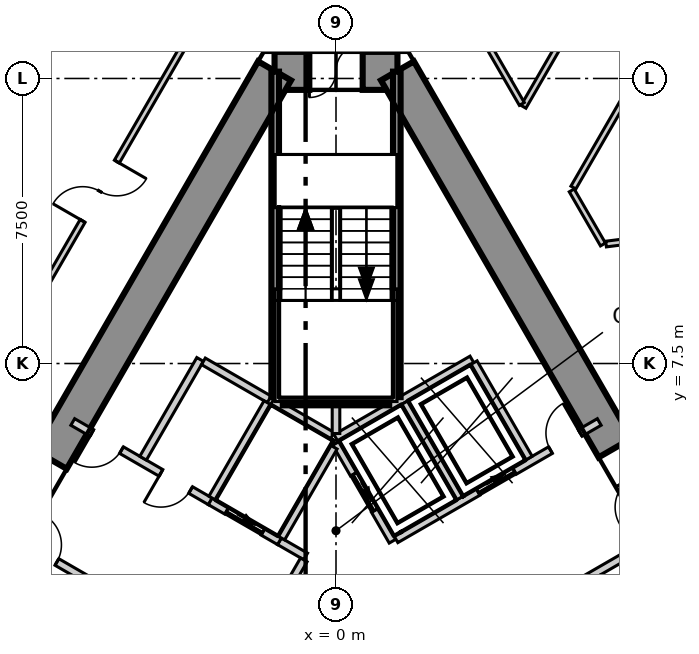
"""IFC4 building model, lengths in metres.
Left out: names, types, materials, properties, quantities, classifications, styles, units other than length and angle.
Written with IfcOpenShell. Run it as: python <this file> out.ifc"""

import sys

from ifc_helpers import new_model, si_unit, direction, frame, frame_2d, origin, place, context, subcontext, project, spatial, polyline, rectangle, outline, extrude, element, fill, save


model = new_model("IFC4")
c1 = context("Model", 3, precision=1e-05, world=origin(), true_north=direction((0.0, 1.0)))
c2 = subcontext(c1, "Body", "Model", "MODEL_VIEW")
j1 = project(units=[si_unit("LENGTHUNIT", "METRE"), si_unit("PLANEANGLEUNIT", "RADIAN")], contexts=[c1])
p1 = place(None, origin())
s1 = spatial("IfcSite", under=j1, at=p1, CompositionType="ELEMENT")
p2 = place(p1, origin())
s2 = spatial("IfcBuilding", under=s1, at=p2, CompositionType="ELEMENT")
p3 = place(p2, frame((0.0, 0.0, 19.9)))
s3 = spatial("IfcBuildingStorey", under=s2, at=p3, CompositionType="ELEMENT", Elevation=19.9)
p4 = place(p3, frame((1.617, 15.2, -0.4), z_axis=(0.0, 0.0, 1.0), x_axis=(-1.0, 0.0, 0.0)))
e1 = element("IfcWall", 1, at=p4, inside=s3, PredefinedType="SHEAR", context=c2, shape_type="SweptSolid", body=[
    extrude(outline(polyline([(-0.288, -0.5), (1.617, -0.5), (3.522, -0.5), (2.945, 0.5), (1.617, 0.5), (0.289, 0.5), (-0.288, -0.5)])), origin(), (0.0, 0.0, 1.0), 5.4),
])
p5 = place(p4, frame((0.917, 0.0, 0.4)))
e2 = element("IfcOpeningElement", 2, at=p5, cuts=e1, PredefinedType="OPENING", context=c2, shape_type="SweptSolid", body=[
    extrude(rectangle(XDim=1.4, YDim=2.1, at=frame_2d((0.7, 1.05))), frame((0.0, 0.51, 0.0), z_axis=(0.0, -1.0, 0.0), x_axis=(1.0, 0.0, 0.0)), (0.0, 0.0, 1.0), 1.02),
])
p6 = place(p3, frame((-1.617, 15.2, -0.4), z_axis=(0.0, 0.0, 1.0), x_axis=(-0.499992141631, -0.866029940768, 0.0)))
e3 = element("IfcWall", 3, at=p6, inside=s3, PredefinedType="SHEAR", context=c2, shape_type="SweptSolid", body=[
    extrude(outline(polyline([(-0.289, -0.499), (1.656, -0.499), (3.601, -0.499), (5.547, -0.499), (7.492, -0.499), (9.437, -0.5), (11.382, -0.5), (13.328, -0.5), (15.273, -0.5), (17.218, -0.5), (19.163, -0.5), (21.109, -0.5), (23.054, -0.5), (24.999, -0.5), (24.422, 0.5), (22.566, 0.5), (20.709, 0.5), (18.853, 0.5), (16.997, 0.5), (15.14, 0.5), (13.284, 0.5), (11.427, 0.5), (9.571, 0.5), (7.715, 0.5), (5.858, 0.5), (4.002, 0.5), (2.146, 0.5), (0.289, 0.5), (-0.289, -0.499)])), origin(), (0.0, 0.0, 1.0), 5.4),
])
p7 = place(p6, frame((11.805, 0.0, 0.4)))
e4 = element("IfcOpeningElement", 4, at=p7, cuts=e3, PredefinedType="OPENING", context=c2, shape_type="SweptSolid", body=[
    extrude(rectangle(XDim=1.1, YDim=2.1, at=frame_2d((0.55, 1.05))), frame((0.0, 0.51, 0.0), z_axis=(0.0, -1.0, 0.0), x_axis=(1.0, 0.0, 0.0)), (0.0, 0.0, 1.0), 1.02),
])
p8 = place(p3, frame((13.972, -6.2, -0.4), z_axis=(0.0, 0.0, 1.0), x_axis=(-0.499992141631, 0.866029940768, 0.0)))
e5 = element("IfcWall", 5, at=p8, inside=s3, PredefinedType="SHEAR", context=c2, shape_type="SweptSolid", body=[
    extrude(outline(polyline([(-0.288, -0.5), (1.657, -0.5), (3.602, -0.5), (5.547, -0.5), (7.493, -0.5), (9.438, -0.5), (11.383, -0.5), (13.328, -0.5), (15.273, -0.5), (17.218, -0.499), (19.164, -0.499), (21.109, -0.499), (23.054, -0.499), (24.999, -0.499), (24.422, 0.5), (22.566, 0.5), (20.709, 0.5), (18.853, 0.5), (16.996, 0.5), (15.14, 0.5), (13.283, 0.5), (11.427, 0.5), (9.57, 0.5), (7.714, 0.5), (5.857, 0.5), (4.001, 0.5), (2.145, 0.5), (0.288, 0.5), (-0.288, -0.5)])), origin(), (0.0, 0.0, 1.0), 5.4),
])
p9 = place(p8, frame((11.455, 0.0, 0.4)))
e6 = element("IfcOpeningElement", 6, at=p9, cuts=e5, PredefinedType="OPENING", context=c2, shape_type="SweptSolid", body=[
    extrude(rectangle(XDim=1.8, YDim=2.1, at=frame_2d((0.9, 1.05))), frame((0.0, 0.51, 0.0), z_axis=(0.0, -1.0, 0.0), x_axis=(1.0, 0.0, 0.0)), (0.0, 0.0, 1.0), 1.02),
])
p10 = place(p3, frame((-8.977, 7.252, 0.0), z_axis=(0.0, 0.0, 1.0), x_axis=(0.500037258536, 0.86600389149, 0.0)))
e7 = element("IfcWall", 7, at=p10, inside=s3, PredefinedType="PARTITIONING", context=c2, shape_type="SweptSolid", body=[
    extrude(rectangle(XDim=11.949, YDim=0.15, at=frame_2d((5.975, 0.0))), origin(), (0.0, 0.0, 1.0), 5.0),
])
p11 = place(p10, frame((4.62, 0.0, 0.0)))
e8 = element("IfcOpeningElement", 8, at=p11, cuts=e7, PredefinedType="OPENING", context=c2, shape_type="SweptSolid", body=[
    extrude(rectangle(XDim=1.8, YDim=2.1, at=frame_2d((0.9, 1.05))), frame((0.0, 0.085, 0.0), z_axis=(0.0, -1.0, 0.0), x_axis=(1.0, 0.0, 0.0)), (0.0, 0.0, 1.0), 0.17),
])
p12 = place(p3, frame((4.933, 14.255, 0.0), z_axis=(0.0, 0.0, 1.0), x_axis=(0.500039629421, 0.866002522519, 0.0)))
e9 = element("IfcWall", 9, at=p12, inside=s3, PredefinedType="PARTITIONING", context=c2, shape_type="SweptSolid", body=[
    extrude(rectangle(XDim=6.085, YDim=0.15, at=frame_2d((3.043, 0.0))), origin(), (0.0, 0.0, 1.0), 5.0),
])
p13 = place(p3, frame((3.002, 17.6, 0.0), z_axis=(0.0, 0.0, 1.0), x_axis=(0.499998569178, -0.866026229868, 0.0)))
e10 = element("IfcWall", 10, at=p13, inside=s3, PredefinedType="PARTITIONING", context=c2, shape_type="SweptSolid", body=[
    extrude(rectangle(XDim=3.776, YDim=0.15, at=frame_2d((1.888, 0.0))), origin(), (0.0, 0.0, 1.0), 5.0),
])
p14 = place(p3, frame((6.203, 12.055, 0.0), z_axis=(0.0, 0.0, 1.0), x_axis=(0.500245418622, -0.865883664904, 0.0)))
e11 = element("IfcWall", 11, at=p14, inside=s3, PredefinedType="PARTITIONING", context=c2, shape_type="SweptSolid", body=[
    extrude(rectangle(XDim=1.643, YDim=0.15, at=frame_2d((0.822, 0.0))), origin(), (0.0, 0.0, 1.0), 5.0),
])
p15 = place(p3, frame((7.106, 10.643, 0.0), z_axis=(0.0, 0.0, 1.0), x_axis=(0.992038919821, 0.125931654321, 0.0)))
e12 = element("IfcWall", 12, at=p15, inside=s3, PredefinedType="PARTITIONING", context=c2, shape_type="SweptSolid", body=[
    extrude(rectangle(XDim=11.847, YDim=0.15, at=frame_2d((5.924, 0.0))), origin(), (0.0, 0.0, 1.0), 5.0),
])
p16 = place(p3, frame((6.247, 12.13, 0.0), z_axis=(0.0, 0.0, 1.0), x_axis=(0.49995867205, 0.866049263173, 0.0)))
e13 = element("IfcWall", 13, at=p16, inside=s3, PredefinedType="PARTITIONING", context=c2, shape_type="SweptSolid", body=[
    extrude(rectangle(XDim=12.615, YDim=0.15, at=frame_2d((6.307, 0.0))), origin(), (0.0, 0.0, 1.0), 5.0),
])
p17 = place(p16, frame((5.364, 0.0, 0.0)))
e14 = element("IfcOpeningElement", 14, at=p17, cuts=e13, PredefinedType="OPENING", context=c2, shape_type="SweptSolid", body=[
    extrude(rectangle(XDim=1.8, YDim=2.1, at=frame_2d((0.9, 1.05))), frame((0.0, 0.085, 0.0), z_axis=(0.0, -1.0, 0.0), x_axis=(1.0, 0.0, 0.0)), (0.0, 0.0, 1.0), 0.17),
])
p18 = place(p3, frame((-0.002, 5.542, 0.0), z_axis=(0.0, 0.0, 1.0), x_axis=(0.866103910842, 0.499863997127, 0.0)))
e15 = element("IfcWall", 15, at=p18, inside=s3, PredefinedType="SOLIDWALL", context=c2, shape_type="SweptSolid", body=[
    extrude(rectangle(XDim=4.131, YDim=0.2, at=frame_2d((2.065, 0.0))), origin(), (0.0, 0.0, 1.0), 5.0),
])
p19 = place(p3, frame((0.0, 5.4, 0.0), z_axis=(0.0, 0.0, 1.0), x_axis=(0.500103862429, -0.865965430478, 0.0)))
e16 = element("IfcWall", 16, at=p19, inside=s3, PredefinedType="SOLIDWALL", context=c2, shape_type="SweptSolid", body=[
    extrude(rectangle(XDim=2.973, YDim=0.2, at=frame_2d((1.487, 0.0))), origin(), (0.0, 0.0, 1.0), 5.0),
])
p20 = place(p19, frame((0.937, 0.0, 0.0)))
e17 = element("IfcOpeningElement", 17, at=p20, cuts=e16, PredefinedType="OPENING", context=c2, shape_type="SweptSolid", body=[
    extrude(rectangle(XDim=1.1, YDim=2.1, at=frame_2d((0.55, 1.05))), frame((0.0, 0.11, 0.0), z_axis=(0.0, -1.0, 0.0), x_axis=(1.0, 0.0, 0.0)), (0.0, 0.0, 1.0), 0.22),
])
p21 = place(p3, frame((1.578, 2.874, 0.0), z_axis=(0.0, 0.0, 1.0), x_axis=(0.866055259465, 0.499948284879, 0.0)))
e18 = element("IfcWall", 18, at=p21, inside=s3, PredefinedType="SOLIDWALL", context=c2, shape_type="SweptSolid", body=[
    extrude(rectangle(XDim=6.177, YDim=0.2, at=frame_2d((3.088, 0.0))), origin(), (0.0, 0.0, 1.0), 5.0),
])
p22 = place(p21, frame((2.496, 0.0, 0.0)))
e19 = element("IfcOpeningElement", 19, at=p22, cuts=e18, PredefinedType="OPENING", context=c2, shape_type="SweptSolid", body=[
    extrude(rectangle(XDim=1.1, YDim=2.1, at=frame_2d((0.55, 1.05))), frame((0.0, 0.11, 0.0), z_axis=(0.0, -1.0, 0.0), x_axis=(1.0, 0.0, 0.0)), (0.0, 0.0, 1.0), 0.22),
])
p23 = place(p21, frame((4.696, 0.0, 0.0)))
e20 = element("IfcOpeningElement", 20, at=p23, cuts=e18, PredefinedType="OPENING", context=c2, shape_type="SweptSolid", body=[
    extrude(rectangle(XDim=0.9, YDim=2.1, at=frame_2d((0.45, 1.05))), frame((0.0, 0.11, 0.0), z_axis=(0.0, -1.0, 0.0), x_axis=(1.0, 0.0, 0.0)), (0.0, 0.0, 1.0), 0.22),
])
p24 = place(p3, frame((3.278, -0.071, 0.0), z_axis=(0.0, 0.0, 1.0), x_axis=(0.865959795517, 0.500113619639, 0.0)))
e21 = element("IfcWall", 21, at=p24, inside=s3, PredefinedType="SOLIDWALL", context=c2, shape_type="SweptSolid", body=[
    extrude(rectangle(XDim=6.177, YDim=0.2, at=frame_2d((3.088, 0.0))), origin(), (0.0, 0.0, 1.0), 5.0),
])
for number, where, z_axis, x_axis in (
    (22, (3.626, 7.52, 0.0), (0.0, 0.0, 1.0), (0.5, -0.866, 0.0)),
    (23, (1.807, 6.47, 0.0), (0.0, 0.0, 1.0), (0.5, -0.866, 0.0)),
):
    element("IfcWall", number, at=place(p3, frame(where, z_axis=z_axis, x_axis=x_axis)), inside=s3, PredefinedType="SOLIDWALL", context=c2, shape_type="SweptSolid", body=[
        extrude(rectangle(XDim=2.9, YDim=0.2, at=frame_2d((1.45, 0.0))), origin(), (0.0, 0.0, 1.0), 5.0),
    ])
p25 = place(p3, frame((-8.627, 3.018, 0.0), z_axis=(0.0, 0.0, 1.0), x_axis=(0.866039775641, -0.499975106388, 0.0)))
e24 = element("IfcWall", 24, at=p25, inside=s3, PredefinedType="SOLIDWALL", context=c2, shape_type="SweptSolid", body=[
    extrude(rectangle(XDim=4.182, YDim=0.2, at=frame_2d((2.091, 0.0))), origin(), (0.0, 0.0, 1.0), 5.0),
])
p26 = place(p25, frame((2.58, 0.0, 0.0)))
e25 = element("IfcOpeningElement", 25, at=p26, cuts=e24, PredefinedType="OPENING", context=c2, shape_type="SweptSolid", body=[
    extrude(rectangle(XDim=1.1, YDim=2.1, at=frame_2d((0.55, 1.05))), frame((0.0, 0.11, 0.0), z_axis=(0.0, -1.0, 0.0), x_axis=(1.0, 0.0, 0.0)), (0.0, 0.0, 1.0), 0.22),
])
p27 = place(p25, frame((0.58, 0.0, 0.0)))
e26 = element("IfcOpeningElement", 26, at=p27, cuts=e24, PredefinedType="OPENING", context=c2, shape_type="SweptSolid", body=[
    extrude(rectangle(XDim=0.9, YDim=2.1, at=frame_2d((0.45, 1.05))), frame((0.0, 0.11, 0.0), z_axis=(0.0, -1.0, 0.0), x_axis=(1.0, 0.0, 0.0)), (0.0, 0.0, 1.0), 0.22),
])
p28 = place(p3, frame((-6.927, 5.962, 0.0), z_axis=(0.0, 0.0, 1.0), x_axis=(0.866065051207, -0.49993132236, 0.0)))
e27 = element("IfcWall", 27, at=p28, inside=s3, PredefinedType="SOLIDWALL", context=c2, shape_type="SweptSolid", body=[
    extrude(rectangle(XDim=4.182, YDim=0.2, at=frame_2d((2.091, 0.0))), origin(), (0.0, 0.0, 1.0), 5.0),
])
p29 = place(p28, frame((2.68, 0.0, 0.0)))
e28 = element("IfcOpeningElement", 28, at=p29, cuts=e27, PredefinedType="OPENING", context=c2, shape_type="SweptSolid", body=[
    extrude(rectangle(XDim=0.9, YDim=2.1, at=frame_2d((0.45, 1.05))), frame((0.0, 0.11, 0.0), z_axis=(0.0, -1.0, 0.0), x_axis=(1.0, 0.0, 0.0)), (0.0, 0.0, 1.0), 0.22),
])
p30 = place(p28, frame((0.58, 0.0, 0.0)))
e29 = element("IfcOpeningElement", 29, at=p30, cuts=e27, PredefinedType="OPENING", context=c2, shape_type="SweptSolid", body=[
    extrude(rectangle(XDim=0.9, YDim=2.1, at=frame_2d((0.45, 1.05))), frame((0.0, 0.11, 0.0), z_axis=(0.0, -1.0, 0.0), x_axis=(1.0, 0.0, 0.0)), (0.0, 0.0, 1.0), 0.22),
])
p31 = place(p3, frame((-1.488, 2.822, 0.0), z_axis=(0.0, 0.0, 1.0), x_axis=(0.866236612152, -0.499633997809, 0.0)))
e30 = element("IfcWall", 30, at=p31, inside=s3, PredefinedType="SOLIDWALL", context=c2, shape_type="SweptSolid", body=[
    extrude(rectangle(XDim=0.796, YDim=0.2, at=frame_2d((0.398, 0.0))), origin(), (0.0, 0.0, 1.0), 5.0),
])
p32 = place(p3, frame((-5.076, 5.009, 0.0), z_axis=(0.0, 0.0, 1.0), x_axis=(0.50002537861, 0.866010750942, 0.0)))
e31 = element("IfcWall", 31, at=p32, inside=s3, PredefinedType="SOLIDWALL", context=c2, shape_type="SweptSolid", body=[
    extrude(rectangle(XDim=3.0, YDim=0.2, at=frame_2d((1.5, 0.0))), origin(), (0.0, 0.0, 1.0), 5.0),
])
p33 = place(p3, frame((-3.489, 7.557, 0.0), z_axis=(0.0, 0.0, 1.0), x_axis=(0.866010750942, -0.50002537861, 0.0)))
e32 = element("IfcWall", 32, at=p33, inside=s3, PredefinedType="SOLIDWALL", context=c2, shape_type="SweptSolid", body=[
    extrude(rectangle(XDim=2.0, YDim=0.2, at=frame_2d((1.0, 0.0))), origin(), (0.0, 0.0, 1.0), 5.0),
])
p34 = place(p3, frame((-2.444, -0.433, 0.0), z_axis=(0.0, 0.0, 1.0), x_axis=(0.500035624827, 0.866004834804, 0.0)))
e33 = element("IfcWall", 33, at=p34, inside=s3, PredefinedType="SOLIDWALL", context=c2, shape_type="SweptSolid", body=[
    extrude(rectangle(XDim=3.194, YDim=0.2, at=frame_2d((1.597, 0.0))), origin(), (0.0, 0.0, 1.0), 5.0),
])
p35 = place(p3, frame((-3.309, 3.873, 0.0), z_axis=(0.0, 0.0, 1.0), x_axis=(0.866098583652, -0.499873227325, 0.0)))
e34 = element("IfcWall", 34, at=p35, inside=s3, PredefinedType="SOLIDWALL", context=c2, shape_type="SweptSolid", body=[
    extrude(rectangle(XDim=2.103, YDim=0.2, at=frame_2d((1.051, 0.0))), origin(), (0.0, 0.0, 1.0), 5.0),
])
p36 = place(p35, frame((0.502, 0.0, 0.0)))
e35 = element("IfcOpeningElement", 35, at=p36, cuts=e34, PredefinedType="OPENING", context=c2, shape_type="SweptSolid", body=[
    extrude(rectangle(XDim=1.1, YDim=2.1, at=frame_2d((0.55, 1.05))), frame((0.0, 0.11, 0.0), z_axis=(0.0, -1.0, 0.0), x_axis=(1.0, 0.0, 0.0)), (0.0, 0.0, 1.0), 0.22),
])
p37 = place(p3, frame((-3.257, 3.959, 0.0), z_axis=(0.0, 0.0, 1.0), x_axis=(0.50012328804, 0.865954211699, 0.0)))
e36 = element("IfcWall", 36, at=p37, inside=s3, PredefinedType="SOLIDWALL", context=c2, shape_type="SweptSolid", body=[
    extrude(rectangle(XDim=2.9, YDim=0.2, at=frame_2d((1.45, 0.0))), origin(), (0.0, 0.0, 1.0), 5.0),
])
p38 = place(p3, frame((-1.67, 6.507, 0.0), z_axis=(0.0, 0.0, 1.0), x_axis=(0.865941441609, -0.500145398563, 0.0)))
e37 = element("IfcWall", 37, at=p38, inside=s3, PredefinedType="SOLIDWALL", context=c2, shape_type="SweptSolid", body=[
    extrude(rectangle(XDim=1.815, YDim=0.2, at=frame_2d((0.908, 0.0))), origin(), (0.0, 0.0, 1.0), 5.0),
])
p39 = place(p3, frame((-1.438, 2.909, 0.0), z_axis=(0.0, 0.0, 1.0), x_axis=(0.499829630636, 0.866123744241, 0.0)))
e38 = element("IfcWall", 38, at=p39, inside=s3, PredefinedType="SOLIDWALL", context=c2, shape_type="SweptSolid", body=[
    extrude(rectangle(XDim=2.761, YDim=0.2, at=frame_2d((1.38, 0.0))), origin(), (0.0, 0.0, 1.0), 5.0),
])
p40 = place(p3, frame((0.0, 5.658, 0.0), z_axis=(0.0, 0.0, 1.0), x_axis=(0.0, 1.0, 0.0)))
e39 = element("IfcWall", 39, at=p40, inside=s3, PredefinedType="SOLIDWALL", context=c2, shape_type="SweptSolid", body=[
    extrude(rectangle(XDim=0.742, YDim=0.2, at=frame_2d((0.371, 0.0))), origin(), (0.0, 0.0, 1.0), 5.0),
])
p41 = place(p3, frame((1.6, 6.615, 0.0), z_axis=(0.0, 0.0, 1.0), x_axis=(0.0, 1.0, 0.0)))
e40 = element("IfcWall", 40, at=p41, inside=s3, PredefinedType="SOLIDWALL", context=c2, shape_type="SweptSolid", body=[
    extrude(rectangle(XDim=8.565, YDim=0.2, at=frame_2d((4.282, 0.0))), origin(), (0.0, 0.0, 1.0), 5.0),
])
p42 = place(p3, frame((-1.4, 6.5, 0.0), z_axis=(0.0, 0.0, 1.0), x_axis=(1.0, 0.0, 0.0)))
e41 = element("IfcWall", 41, at=p42, inside=s3, PredefinedType="SOLIDWALL", context=c2, shape_type="SweptSolid", body=[
    extrude(rectangle(XDim=2.8, YDim=0.2, at=frame_2d((1.4, 0.0))), origin(), (0.0, 0.0, 1.0), 5.0),
])
p43 = place(p3, frame((-1.6, 6.615, 0.0), z_axis=(0.0, 0.0, 1.0), x_axis=(0.0, 1.0, 0.0)))
e42 = element("IfcWall", 42, at=p43, inside=s3, PredefinedType="SOLIDWALL", context=c2, shape_type="SweptSolid", body=[
    extrude(rectangle(XDim=8.565, YDim=0.2, at=frame_2d((4.282, 0.0))), origin(), (0.0, 0.0, 1.0), 5.0),
])
p44 = place(p20, origin())
e43 = element("IfcDoor", 43, at=p44, inside=s3, OperationType="SLIDING_TO_LEFT", PredefinedType="DOOR", context=c2, shape_type="SweptSolid", body=[
    extrude(rectangle(XDim=1.1, YDim=2.1, at=frame_2d((0.55, 1.05))), frame((0.0, 0.025, 0.0), z_axis=(0.0, -1.0, 0.0), x_axis=(1.0, 0.0, 0.0)), (0.0, 0.0, 1.0), 0.05),
])
fill(e17, e43)
p45 = place(p22, origin())
e44 = element("IfcDoor", 44, at=p45, inside=s3, OperationType="SLIDING_TO_LEFT", PredefinedType="DOOR", context=c2, shape_type="SweptSolid", body=[
    extrude(rectangle(XDim=1.1, YDim=2.1, at=frame_2d((0.55, 1.05))), frame((0.0, 0.025, 0.0), z_axis=(0.0, -1.0, 0.0), x_axis=(1.0, 0.0, 0.0)), (0.0, 0.0, 1.0), 0.05),
])
fill(e19, e44)
p46 = place(p36, origin())
e45 = element("IfcDoor", 45, at=p46, inside=s3, OperationType="SLIDING_TO_LEFT", PredefinedType="DOOR", context=c2, shape_type="SweptSolid", body=[
    extrude(rectangle(XDim=1.1, YDim=2.1, at=frame_2d((0.55, 1.05))), frame((0.0, 0.025, 0.0), z_axis=(0.0, -1.0, 0.0), x_axis=(1.0, 0.0, 0.0)), (0.0, 0.0, 1.0), 0.05),
])
fill(e35, e45)
p47 = place(p29, origin())
e46 = element("IfcDoor", 46, at=p47, inside=s3, OperationType="SINGLE_SWING_LEFT", PredefinedType="DOOR", context=c2, shape_type="SweptSolid", body=[
    extrude(rectangle(XDim=0.9, YDim=2.1, at=frame_2d((0.45, 1.05))), frame((0.0, 0.025, 0.0), z_axis=(0.0, -1.0, 0.0), x_axis=(1.0, 0.0, 0.0)), (0.0, 0.0, 1.0), 0.05),
])
fill(e28, e46)
p48 = place(p11, origin())
e47 = element("IfcDoor", 47, at=p48, inside=s3, OperationType="DOUBLE_DOOR_SINGLE_SWING", PredefinedType="DOOR", context=c2, shape_type="SweptSolid", body=[
    extrude(rectangle(XDim=1.8, YDim=2.1, at=frame_2d((0.9, 1.05))), frame((0.0, 0.025, 0.0), z_axis=(0.0, -1.0, 0.0), x_axis=(1.0, 0.0, 0.0)), (0.0, 0.0, 1.0), 0.05),
])
fill(e8, e47)
p49 = place(p9, origin())
e48 = element("IfcDoor", 48, at=p49, inside=s3, OperationType="DOUBLE_DOOR_SINGLE_SWING", PredefinedType="DOOR", context=c2, shape_type="SweptSolid", body=[
    extrude(rectangle(XDim=1.8, YDim=2.1, at=frame_2d((0.9, 1.05))), frame((0.0, 0.025, 0.0), z_axis=(0.0, -1.0, 0.0), x_axis=(1.0, 0.0, 0.0)), (0.0, 0.0, 1.0), 0.05),
])
fill(e6, e48)
p50 = place(p5, origin())
e49 = element("IfcDoor", 49, at=p50, inside=s3, OperationType="DOUBLE_DOOR_SINGLE_SWING", PredefinedType="DOOR", context=c2, shape_type="SweptSolid", body=[
    extrude(rectangle(XDim=1.4, YDim=2.1, at=frame_2d((0.7, 1.05))), frame((0.0, 0.025, 0.0), z_axis=(0.0, -1.0, 0.0), x_axis=(1.0, 0.0, 0.0)), (0.0, 0.0, 1.0), 0.05),
])
fill(e2, e49)
p51 = place(p27, origin())
e50 = element("IfcDoor", 50, at=p51, inside=s3, OperationType="SINGLE_SWING_RIGHT", PredefinedType="DOOR", context=c2, shape_type="SweptSolid", body=[
    extrude(rectangle(XDim=0.9, YDim=2.1, at=frame_2d((0.45, 1.05))), frame((0.0, 0.025, 0.0), z_axis=(0.0, -1.0, 0.0), x_axis=(1.0, 0.0, 0.0)), (0.0, 0.0, 1.0), 0.05),
])
fill(e26, e50)
p52 = place(p30, origin())
e51 = element("IfcDoor", 51, at=p52, inside=s3, OperationType="SINGLE_SWING_LEFT", PredefinedType="DOOR", context=c2, shape_type="SweptSolid", body=[
    extrude(rectangle(XDim=0.9, YDim=2.1, at=frame_2d((0.45, 1.05))), frame((0.0, 0.025, 0.0), z_axis=(0.0, -1.0, 0.0), x_axis=(1.0, 0.0, 0.0)), (0.0, 0.0, 1.0), 0.05),
])
fill(e29, e51)
p53 = place(p23, origin())
e52 = element("IfcDoor", 52, at=p53, inside=s3, OperationType="SINGLE_SWING_LEFT", PredefinedType="DOOR", context=c2, shape_type="SweptSolid", body=[
    extrude(rectangle(XDim=0.9, YDim=2.1, at=frame_2d((0.45, 1.05))), frame((0.0, 0.025, 0.0), z_axis=(0.0, -1.0, 0.0), x_axis=(1.0, 0.0, 0.0)), (0.0, 0.0, 1.0), 0.05),
])
fill(e20, e52)
save(model, sys.argv[1])
